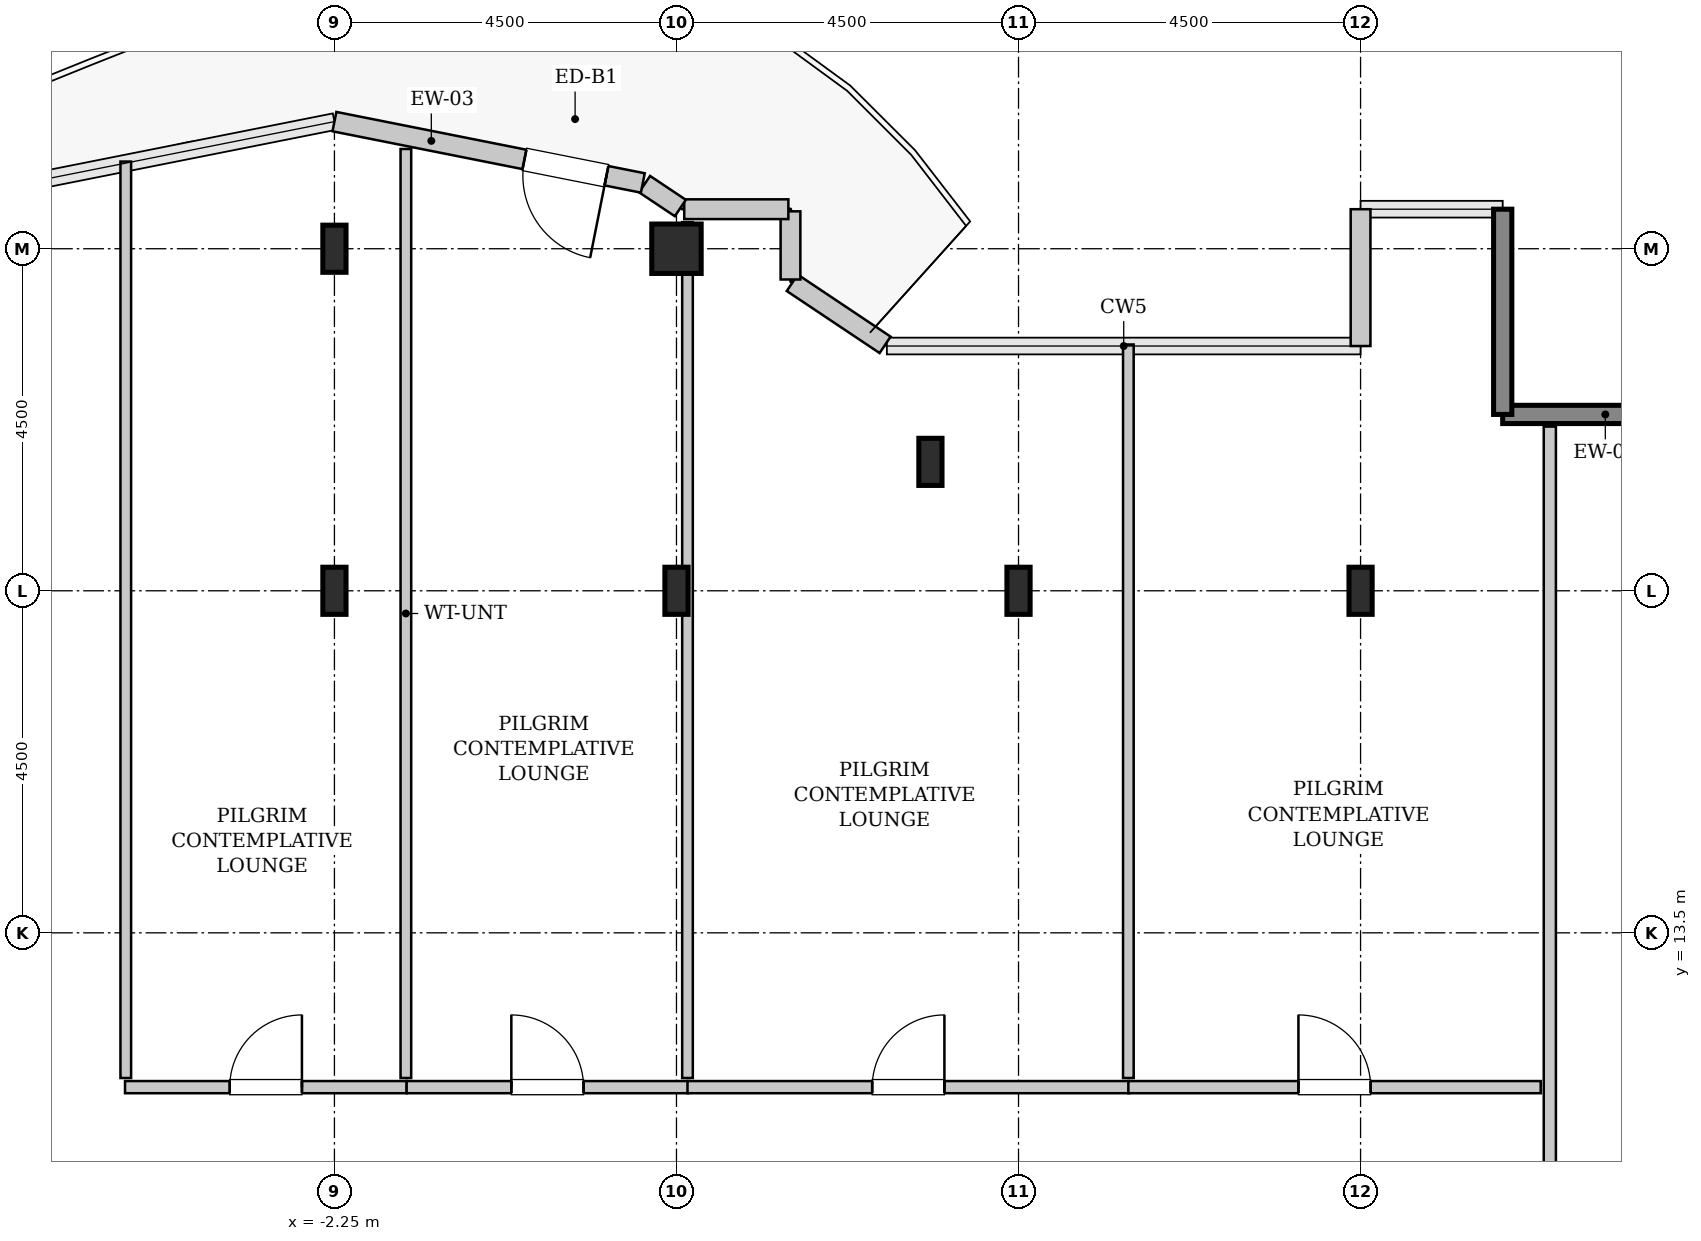
"""IFC4 building model, lengths in metres.
Left out: names, types, materials, properties, quantities, classifications, styles, units other than length and angle.
Written with IfcOpenShell. Run it as: python <this file> out.ifc"""

import sys

from ifc_helpers import new_model, si_unit, direction, frame, frame_2d, origin, origin_2d, place, context, subcontext, project, spatial, rectangle, hollow_rectangle, i_section, extrude, source, transform, mapped, element, fill, save


model = new_model("IFC4")
c1 = context("Model", 3, precision=1e-05, world=origin(), true_north=direction((0.0, 1.0)))
c2 = subcontext(c1, "Body", "Model", "MODEL_VIEW")
j1 = project(units=[si_unit("LENGTHUNIT", "METRE"), si_unit("PLANEANGLEUNIT", "RADIAN")], contexts=[c1])
p1 = place(None, origin())
s1 = spatial("IfcSite", under=j1, at=p1, CompositionType="ELEMENT")
p2 = place(p1, origin())
s2 = spatial("IfcBuilding", under=s1, at=p2, CompositionType="ELEMENT")
p3 = place(p2, frame((0.0, 0.0, 268.4)))
s3 = spatial("IfcBuildingStorey", under=s2, at=p3, CompositionType="ELEMENT", Elevation=268.4)
m1 = source(origin(), c2, "Body", "SweptSolid", [
    extrude(i_section(OverallWidth=0.305, OverallDepth=0.62, WebThickness=0.021, FlangeThickness=0.04, FilletRadius=0.027, at=origin_2d()), origin(), (0.0, 0.0, 1.0), 3.8),
])
for number, where, z_axis, x_axis in (
    (1, (-2.25, 18.0, 0.0), (0.0, 0.0, 1.0), (1.0, 0.0, 0.0)),
    (2, (-2.25, 22.5, 0.0), (0.0, 0.0, 1.0), (1.0, 0.0, 0.0)),
    (3, (2.25, 18.0, 0.0), (0.0, 0.0, 1.0), (1.0, 0.0, 0.0)),
):
    element("IfcColumn", number, at=place(p3, frame(where, z_axis=z_axis, x_axis=x_axis)), inside=s3, PredefinedType="COLUMN", context=c2, shape_type="MappedRepresentation", body=[
        mapped(m1, transform((0.0, 0.0, 0.0), x_axis=(1.0, 0.0, 0.0), y_axis=(0.0, 1.0, 0.0), z_axis=(0.0, 0.0, 1.0), scale=1.0)),
    ])
m2 = source(origin(), c2, "Body", "SweptSolid", [
    extrude(hollow_rectangle(XDim=0.65, YDim=0.65, WallThickness=0.032, InnerFilletRadius=0.032, OuterFilletRadius=0.064, at=origin_2d()), origin(), (0.0, 0.0, 1.0), 3.8),
])
p4 = place(p3, frame((2.25, 22.5, 0.0), z_axis=(0.0, 0.0, 1.0), x_axis=(1.0, 0.0, 0.0)))
e4 = element("IfcColumn", 4, at=p4, inside=s3, PredefinedType="COLUMN", context=c2, shape_type="MappedRepresentation", body=[
    mapped(m2, transform((0.0, 0.0, 0.0), x_axis=(1.0, 0.0, 0.0), y_axis=(0.0, 1.0, 0.0), z_axis=(0.0, 0.0, 1.0), scale=1.0)),
])
for number, where, z_axis, x_axis in (
    (5, (5.591, 19.696, 0.0), (0.0, 0.0, 1.0), (1.0, 0.0, 0.0)),
    (6, (6.75, 18.0, 0.0), (0.0, 0.0, 1.0), (1.0, 0.0, 0.0)),
    (7, (11.25, 18.0, 0.0), (0.0, 0.0, 1.0), (1.0, 0.0, 0.0)),
):
    element("IfcColumn", number, at=place(p3, frame(where, z_axis=z_axis, x_axis=x_axis)), inside=s3, PredefinedType="COLUMN", context=c2, shape_type="MappedRepresentation", body=[
        mapped(m1, transform((0.0, 0.0, 0.0), x_axis=(1.0, 0.0, 0.0), y_axis=(0.0, 1.0, 0.0), z_axis=(0.0, 0.0, 1.0), scale=1.0)),
    ])
m3 = source(origin(), c2, "Body", "SweptSolid", [
    extrude(rectangle(XDim=2.7, YDim=0.24, at=frame_2d((1.35, 0.0))), origin(), (0.0, 0.0, 1.0), 3.55),
])
for number, where, z_axis, x_axis in (
    (8, (15.82, 20.32, 0.0), (0.0, 0.0, 1.0), (-1.0, 0.0, 0.0)),
    (9, (13.12, 20.32, 0.0), (0.0, 0.0, 1.0), (0.0, 1.0, 0.0)),
):
    element("IfcWall", number, at=place(p3, frame(where, z_axis=z_axis, x_axis=x_axis)), inside=s3, PredefinedType="SHEAR", context=c2, shape_type="MappedRepresentation", body=[
        mapped(m3, transform((0.0, 0.0, 0.0), x_axis=(1.0, 0.0, 0.0), y_axis=(0.0, 1.0, 0.0), z_axis=(0.0, 0.0, 1.0), scale=1.0)),
    ])
m4 = source(origin(), c2, "Body", "SweptSolid", [
    extrude(rectangle(XDim=1.8, YDim=0.26, at=frame_2d((0.9, 0.0))), origin(), (0.0, 0.0, 1.0), 3.55),
])
p5 = place(p3, frame((11.25, 23.02, 0.0), z_axis=(0.0, 0.0, 1.0), x_axis=(0.0, -1.0, 0.0)))
e10 = element("IfcWall", 10, at=p5, inside=s3, PredefinedType="SOLIDWALL", context=c2, shape_type="MappedRepresentation", body=[
    mapped(m4, transform((0.0, 0.0, 0.0), x_axis=(1.0, 0.0, 0.0), y_axis=(0.0, 1.0, 0.0), z_axis=(0.0, 0.0, 1.0), scale=1.0)),
])
m5 = source(origin(), c2, "Body", "SweptSolid", [
    extrude(rectangle(XDim=1.469, YDim=0.26, at=frame_2d((0.734, 0.0))), origin(), (0.0, 0.0, 1.0), 3.55),
])
p6 = place(p3, frame((4.995, 21.236, 0.0), z_axis=(0.0, 0.0, 1.0), x_axis=(-0.831461760506, 0.555581983884, 0.0)))
e11 = element("IfcWall", 11, at=p6, inside=s3, PredefinedType="SOLIDWALL", context=c2, shape_type="MappedRepresentation", body=[
    mapped(m5, transform((0.0, 0.0, 0.0), x_axis=(1.0, 0.0, 0.0), y_axis=(0.0, 1.0, 0.0), z_axis=(0.0, 0.0, 1.0), scale=1.0)),
])
m6 = source(origin(), c2, "Body", "SweptSolid", [
    extrude(rectangle(XDim=0.897, YDim=0.26, at=frame_2d((0.448, 0.0))), origin(), (0.0, 0.0, 1.0), 3.55),
])
p7 = place(p3, frame((3.75, 22.095, 0.0), z_axis=(0.0, 0.0, 1.0), x_axis=(0.0, 1.0, 0.0)))
e12 = element("IfcWall", 12, at=p7, inside=s3, PredefinedType="SOLIDWALL", context=c2, shape_type="MappedRepresentation", body=[
    mapped(m6, transform((0.0, 0.0, 0.0), x_axis=(1.0, 0.0, 0.0), y_axis=(0.0, 1.0, 0.0), z_axis=(0.0, 0.0, 1.0), scale=1.0)),
])
m7 = source(origin(), c2, "Body", "SweptSolid", [
    extrude(rectangle(XDim=1.37, YDim=0.26, at=frame_2d((0.685, 0.0))), origin(), (0.0, 0.0, 1.0), 3.55),
])
p8 = place(p3, frame((3.722, 23.02, 0.0), z_axis=(0.0, 0.0, 1.0), x_axis=(-1.0, 0.0, 0.0)))
e13 = element("IfcWall", 13, at=p8, inside=s3, PredefinedType="SOLIDWALL", context=c2, shape_type="MappedRepresentation", body=[
    mapped(m7, transform((0.0, 0.0, 0.0), x_axis=(1.0, 0.0, 0.0), y_axis=(0.0, 1.0, 0.0), z_axis=(0.0, 0.0, 1.0), scale=1.0)),
])
m8 = source(origin(), c2, "Body", "SweptSolid", [
    extrude(rectangle(XDim=0.565, YDim=0.26, at=frame_2d((0.283, 0.0))), origin(), (0.0, 0.0, 1.0), 3.55),
])
p9 = place(p3, frame((2.301, 23.036, 0.0), z_axis=(0.0, 0.0, 1.0), x_axis=(-0.831651492666, 0.555297933317, 0.0)))
e14 = element("IfcWall", 14, at=p9, inside=s3, PredefinedType="SOLIDWALL", context=c2, shape_type="MappedRepresentation", body=[
    mapped(m8, transform((0.0, 0.0, 0.0), x_axis=(1.0, 0.0, 0.0), y_axis=(0.0, 1.0, 0.0), z_axis=(0.0, 0.0, 1.0), scale=1.0)),
])
m9 = source(origin(), c2, "Body", "SweptSolid", [
    extrude(rectangle(XDim=4.137, YDim=0.26, at=frame_2d((2.068, 0.0))), origin(), (0.0, 0.0, 1.0), 3.55),
])
p10 = place(p3, frame((1.807, 23.365, 0.0), z_axis=(0.0, 0.0, 1.0), x_axis=(-0.980782170794, 0.195105954428, 0.0)))
e15 = element("IfcWall", 15, at=p10, inside=s3, PredefinedType="SOLIDWALL", context=c2, shape_type="MappedRepresentation", body=[
    mapped(m9, transform((0.0, 0.0, 0.0), x_axis=(1.0, 0.0, 0.0), y_axis=(0.0, 1.0, 0.0), z_axis=(0.0, 0.0, 1.0), scale=1.0)),
])
p11 = place(p10, frame((0.488, 0.0, 0.0)))
e16 = element("IfcOpeningElement", 16, at=p11, cuts=e15, PredefinedType="OPENING", context=c2, shape_type="SweptSolid", body=[
    extrude(rectangle(XDim=1.1, YDim=2.2, at=frame_2d((0.55, 1.1))), frame((0.0, 0.14, 0.0), z_axis=(0.0, -1.0, 0.0), x_axis=(1.0, 0.0, 0.0)), (0.0, 0.0, 1.0), 0.28),
])
m10 = source(origin(), c2, "Body", "SweptSolid", [
    extrude(rectangle(XDim=11.665, YDim=0.16, at=frame_2d((5.833, 0.0))), origin(), (0.0, 0.0, 1.0), 3.535),
])
p12 = place(p3, frame((13.74, 8.495, 0.0), z_axis=(0.0, 0.0, 1.0), x_axis=(0.0, 1.0, 0.0)))
e17 = element("IfcWall", 17, at=p12, inside=s3, PredefinedType="PARTITIONING", context=c2, shape_type="MappedRepresentation", body=[
    mapped(m10, transform((0.0, 0.0, 0.0), x_axis=(1.0, 0.0, 0.0), y_axis=(0.0, 1.0, 0.0), z_axis=(0.0, 0.0, 1.0), scale=1.0)),
])
p13 = place(p12, frame((1.032, 0.0, 0.0)))
e18 = element("IfcOpeningElement", 18, at=p13, cuts=e17, PredefinedType="OPENING", context=c2, shape_type="SweptSolid", body=[
    extrude(rectangle(XDim=0.95, YDim=2.1, at=frame_2d((0.475, 1.05))), frame((0.0, 0.09, 0.0), z_axis=(0.0, -1.0, 0.0), x_axis=(1.0, 0.0, 0.0)), (0.0, 0.0, 1.0), 0.18),
])
m11 = source(origin(), c2, "Body", "SweptSolid", [
    extrude(rectangle(XDim=3.705, YDim=0.16, at=frame_2d((1.853, 0.0))), origin(), (0.0, 0.0, 1.0), 3.535),
])
p14 = place(p3, frame((-5.005, 11.47, 0.0), z_axis=(0.0, 0.0, 1.0), x_axis=(1.0, 0.0, 0.0)))
e19 = element("IfcWall", 19, at=p14, inside=s3, PredefinedType="PARTITIONING", context=c2, shape_type="MappedRepresentation", body=[
    mapped(m11, transform((0.0, 0.0, 0.0), x_axis=(1.0, 0.0, 0.0), y_axis=(0.0, 1.0, 0.0), z_axis=(0.0, 0.0, 1.0), scale=1.0)),
])
p15 = place(p14, frame((1.377, 0.0, 0.0)))
e20 = element("IfcOpeningElement", 20, at=p15, cuts=e19, PredefinedType="OPENING", context=c2, shape_type="SweptSolid", body=[
    extrude(rectangle(XDim=0.95, YDim=2.1, at=frame_2d((0.475, 1.05))), frame((0.0, 0.09, 0.0), z_axis=(0.0, -1.0, 0.0), x_axis=(1.0, 0.0, 0.0)), (0.0, 0.0, 1.0), 0.18),
])
m12 = source(origin(), c2, "Body", "SweptSolid", [
    extrude(rectangle(XDim=12.222, YDim=0.14, at=frame_2d((6.111, 0.0))), origin(), (0.0, 0.0, 1.0), 3.535),
])
p16 = place(p3, frame((-1.31, 11.59, 0.0), z_axis=(0.0, 0.0, 1.0), x_axis=(0.0, 1.0, 0.0)))
e21 = element("IfcWall", 21, at=p16, inside=s3, PredefinedType="PARTITIONING", context=c2, shape_type="MappedRepresentation", body=[
    mapped(m12, transform((0.0, 0.0, 0.0), x_axis=(1.0, 0.0, 0.0), y_axis=(0.0, 1.0, 0.0), z_axis=(0.0, 0.0, 1.0), scale=1.0)),
])
m13 = source(origin(), c2, "Body", "SweptSolid", [
    extrude(rectangle(XDim=12.057, YDim=0.14, at=frame_2d((6.028, 0.0))), origin(), (0.0, 0.0, 1.0), 3.535),
])
p17 = place(p3, frame((-4.995, 11.59, 0.0), z_axis=(0.0, 0.0, 1.0), x_axis=(0.0, 1.0, 0.0)))
e22 = element("IfcWall", 22, at=p17, inside=s3, PredefinedType="PARTITIONING", context=c2, shape_type="MappedRepresentation", body=[
    mapped(m13, transform((0.0, 0.0, 0.0), x_axis=(1.0, 0.0, 0.0), y_axis=(0.0, 1.0, 0.0), z_axis=(0.0, 0.0, 1.0), scale=1.0)),
])
m14 = source(origin(), c2, "Body", "SweptSolid", [
    extrude(rectangle(XDim=3.705, YDim=0.16, at=frame_2d((1.853, 0.0))), origin(), (0.0, 0.0, 1.0), 3.535),
])
p18 = place(p3, frame((-1.3, 11.47, 0.0), z_axis=(0.0, 0.0, 1.0), x_axis=(1.0, 0.0, 0.0)))
e23 = element("IfcWall", 23, at=p18, inside=s3, PredefinedType="PARTITIONING", context=c2, shape_type="MappedRepresentation", body=[
    mapped(m14, transform((0.0, 0.0, 0.0), x_axis=(1.0, 0.0, 0.0), y_axis=(0.0, 1.0, 0.0), z_axis=(0.0, 0.0, 1.0), scale=1.0)),
])
p19 = place(p18, frame((1.377, 0.0, 0.0)))
e24 = element("IfcOpeningElement", 24, at=p19, cuts=e23, PredefinedType="OPENING", context=c2, shape_type="SweptSolid", body=[
    extrude(rectangle(XDim=0.95, YDim=2.1, at=frame_2d((0.475, 1.05))), frame((0.0, 0.09, 0.0), z_axis=(0.0, -1.0, 0.0), x_axis=(1.0, 0.0, 0.0)), (0.0, 0.0, 1.0), 0.18),
])
m15 = source(origin(), c2, "Body", "SweptSolid", [
    extrude(rectangle(XDim=11.26, YDim=0.14, at=frame_2d((5.63, 0.0))), origin(), (0.0, 0.0, 1.0), 2.925),
])
p20 = place(p3, frame((2.395, 11.59, 0.0), z_axis=(0.0, 0.0, 1.0), x_axis=(0.0, 1.0, 0.0)))
e25 = element("IfcWall", 25, at=p20, inside=s3, PredefinedType="PARTITIONING", context=c2, shape_type="MappedRepresentation", body=[
    mapped(m15, transform((0.0, 0.0, 0.0), x_axis=(1.0, 0.0, 0.0), y_axis=(0.0, 1.0, 0.0), z_axis=(0.0, 0.0, 1.0), scale=1.0)),
])
m16 = source(origin(), c2, "Body", "SweptSolid", [
    extrude(rectangle(XDim=5.81, YDim=0.16, at=frame_2d((2.905, 0.0))), origin(), (0.0, 0.0, 1.0), 3.535),
])
p21 = place(p3, frame((2.395, 11.47, 0.0), z_axis=(0.0, 0.0, 1.0), x_axis=(1.0, 0.0, 0.0)))
e26 = element("IfcWall", 26, at=p21, inside=s3, PredefinedType="PARTITIONING", context=c2, shape_type="MappedRepresentation", body=[
    mapped(m16, transform((0.0, 0.0, 0.0), x_axis=(1.0, 0.0, 0.0), y_axis=(0.0, 1.0, 0.0), z_axis=(0.0, 0.0, 1.0), scale=1.0)),
])
p22 = place(p21, frame((2.43, 0.0, 0.0)))
e27 = element("IfcOpeningElement", 27, at=p22, cuts=e26, PredefinedType="OPENING", context=c2, shape_type="SweptSolid", body=[
    extrude(rectangle(XDim=0.95, YDim=2.1, at=frame_2d((0.475, 1.05))), frame((0.0, 0.09, 0.0), z_axis=(0.0, -1.0, 0.0), x_axis=(1.0, 0.0, 0.0)), (0.0, 0.0, 1.0), 0.18),
])
m17 = source(origin(), c2, "Body", "SweptSolid", [
    extrude(rectangle(XDim=9.65, YDim=0.14, at=frame_2d((4.825, 0.0))), origin(), (0.0, 0.0, 1.0), 3.535),
])
p23 = place(p3, frame((8.195, 11.59, 0.0), z_axis=(0.0, 0.0, 1.0), x_axis=(0.0, 1.0, 0.0)))
e28 = element("IfcWall", 28, at=p23, inside=s3, PredefinedType="PARTITIONING", context=c2, shape_type="MappedRepresentation", body=[
    mapped(m17, transform((0.0, 0.0, 0.0), x_axis=(1.0, 0.0, 0.0), y_axis=(0.0, 1.0, 0.0), z_axis=(0.0, 0.0, 1.0), scale=1.0)),
])
m18 = source(origin(), c2, "Body", "SweptSolid", [
    extrude(rectangle(XDim=5.425, YDim=0.16, at=frame_2d((2.712, 0.0))), origin(), (0.0, 0.0, 1.0), 3.535),
])
p24 = place(p3, frame((8.195, 11.47, 0.0), z_axis=(0.0, 0.0, 1.0), x_axis=(1.0, 0.0, 0.0)))
e29 = element("IfcWall", 29, at=p24, inside=s3, PredefinedType="PARTITIONING", context=c2, shape_type="MappedRepresentation", body=[
    mapped(m18, transform((0.0, 0.0, 0.0), x_axis=(1.0, 0.0, 0.0), y_axis=(0.0, 1.0, 0.0), z_axis=(0.0, 0.0, 1.0), scale=1.0)),
])
p25 = place(p24, frame((2.238, 0.0, 0.0)))
e30 = element("IfcOpeningElement", 30, at=p25, cuts=e29, PredefinedType="OPENING", context=c2, shape_type="SweptSolid", body=[
    extrude(rectangle(XDim=0.95, YDim=2.1, at=frame_2d((0.475, 1.05))), frame((0.0, 0.09, 0.0), z_axis=(0.0, -1.0, 0.0), x_axis=(1.0, 0.0, 0.0)), (0.0, 0.0, 1.0), 0.18),
])
m19 = source(origin(), c2, "Body", "SweptSolid", [
    extrude(rectangle(XDim=1.1, YDim=2.2, at=frame_2d((0.55, 1.1))), frame((0.0, 0.025, 0.0), z_axis=(0.0, -1.0, 0.0), x_axis=(1.0, 0.0, 0.0)), (0.0, 0.0, 1.0), 0.05),
])
p26 = place(p11, origin())
e31 = element("IfcDoor", 31, at=p26, inside=s3, OperationType="SINGLE_SWING_LEFT", PredefinedType="DOOR", context=c2, shape_type="MappedRepresentation", body=[
    mapped(m19, transform((0.0, 0.0, 0.0), x_axis=(1.0, 0.0, 0.0), y_axis=(0.0, 1.0, 0.0), z_axis=(0.0, 0.0, 1.0), scale=1.0)),
])
fill(e16, e31)
m20 = source(origin(), c2, "Body", "SweptSolid", [
    extrude(rectangle(XDim=0.95, YDim=2.1, at=frame_2d((0.475, 1.05))), frame((0.0, 0.025, 0.0), z_axis=(0.0, -1.0, 0.0), x_axis=(1.0, 0.0, 0.0)), (0.0, 0.0, 1.0), 0.05),
])
p27 = place(p15, origin())
e32 = element("IfcDoor", 32, at=p27, inside=s3, OperationType="SINGLE_SWING_RIGHT", PredefinedType="DOOR", context=c2, shape_type="MappedRepresentation", body=[
    mapped(m20, transform((0.0, 0.0, 0.0), x_axis=(1.0, 0.0, 0.0), y_axis=(0.0, 1.0, 0.0), z_axis=(0.0, 0.0, 1.0), scale=1.0)),
])
fill(e20, e32)
p28 = place(p19, origin())
e33 = element("IfcDoor", 33, at=p28, inside=s3, OperationType="SINGLE_SWING_LEFT", PredefinedType="DOOR", context=c2, shape_type="MappedRepresentation", body=[
    mapped(m20, transform((0.0, 0.0, 0.0), x_axis=(1.0, 0.0, 0.0), y_axis=(0.0, 1.0, 0.0), z_axis=(0.0, 0.0, 1.0), scale=1.0)),
])
fill(e24, e33)
p29 = place(p22, origin())
e34 = element("IfcDoor", 34, at=p29, inside=s3, OperationType="SINGLE_SWING_RIGHT", PredefinedType="DOOR", context=c2, shape_type="MappedRepresentation", body=[
    mapped(m20, transform((0.0, 0.0, 0.0), x_axis=(1.0, 0.0, 0.0), y_axis=(0.0, 1.0, 0.0), z_axis=(0.0, 0.0, 1.0), scale=1.0)),
])
fill(e27, e34)
p30 = place(p25, origin())
e35 = element("IfcDoor", 35, at=p30, inside=s3, OperationType="SINGLE_SWING_LEFT", PredefinedType="DOOR", context=c2, shape_type="MappedRepresentation", body=[
    mapped(m20, transform((0.0, 0.0, 0.0), x_axis=(1.0, 0.0, 0.0), y_axis=(0.0, 1.0, 0.0), z_axis=(0.0, 0.0, 1.0), scale=1.0)),
])
fill(e30, e35)
save(model, sys.argv[1])
